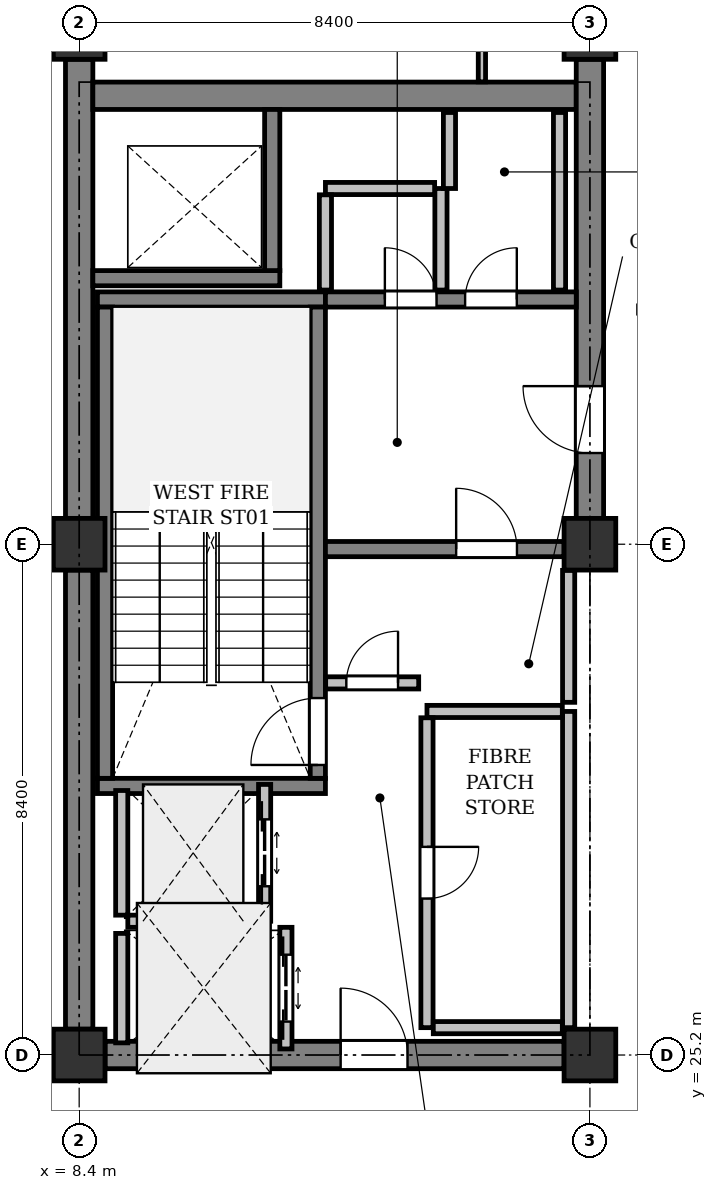
"""IFC4 building model, lengths in metres.
Left out: names, types, materials, properties, quantities, classifications, styles, units other than length and angle.
Written with IfcOpenShell. Run it as: python <this file> out.ifc"""

import sys

from ifc_helpers import new_model, si_unit, direction, frame, frame_2d, origin, origin_2d, place, context, subcontext, project, spatial, rectangle, extrude, element, fill, save


model = new_model("IFC4")
c1 = context("Model", 3, precision=1e-05, world=origin(), true_north=direction((0.0, 1.0)))
c2 = subcontext(c1, "Body", "Model", "MODEL_VIEW")
j1 = project(units=[si_unit("LENGTHUNIT", "METRE"), si_unit("PLANEANGLEUNIT", "RADIAN")], contexts=[c1])
p1 = place(None, origin())
s1 = spatial("IfcSite", under=j1, at=p1, CompositionType="ELEMENT")
p2 = place(p1, origin())
s2 = spatial("IfcBuilding", under=s1, at=p2, CompositionType="ELEMENT")
p3 = place(p2, frame((0.0, 0.0, 302.2)))
s3 = spatial("IfcBuildingStorey", under=s2, at=p3, CompositionType="ELEMENT", Elevation=302.2)
for number, where, z_axis, x_axis in (
    (1, (8.4, 25.2, 0.0), (0.0, 0.0, 1.0), (1.0, 0.0, 0.0)),
    (2, (8.4, 33.6, 0.0), (0.0, 0.0, 1.0), (1.0, 0.0, 0.0)),
    (3, (8.4, 42.0, 0.0), (0.0, 0.0, 1.0), (1.0, 0.0, 0.0)),
    (4, (16.8, 25.2, 0.0), (0.0, 0.0, 1.0), (1.0, 0.0, 0.0)),
    (5, (16.8, 33.6, 0.0), (0.0, 0.0, 1.0), (1.0, 0.0, 0.0)),
    (6, (16.8, 42.0, 0.0), (0.0, 0.0, 1.0), (1.0, 0.0, 0.0)),
):
    element("IfcColumn", number, at=place(p3, frame(where, z_axis=z_axis, x_axis=x_axis)), inside=s3, PredefinedType="COLUMN", context=c2, shape_type="SweptSolid", body=[
        extrude(rectangle(XDim=0.85, YDim=0.85, at=origin_2d()), origin(), (0.0, 0.0, 1.0), 4.0),
    ])
for number, where, z_axis, x_axis in (
    (7, (8.4, 25.625, 0.0), (0.0, 0.0, 1.0), (0.0, 1.0, 0.0)),
    (8, (8.4, 34.025, 0.0), (0.0, 0.0, 1.0), (0.0, 1.0, 0.0)),
):
    element("IfcWall", number, at=place(p3, frame(where, z_axis=z_axis, x_axis=x_axis)), inside=s3, PredefinedType="SHEAR", context=c2, shape_type="SweptSolid", body=[
        extrude(rectangle(XDim=7.55, YDim=0.45, at=frame_2d((3.775, 0.0))), origin(), (0.0, 0.0, 1.0), 3.725),
    ])
p4 = place(p3, frame((8.625, 40.975, 0.0), z_axis=(0.0, 0.0, 1.0), x_axis=(1.0, 0.0, 0.0)))
e9 = element("IfcWall", 9, at=p4, inside=s3, PredefinedType="SHEAR", context=c2, shape_type="SweptSolid", body=[
    extrude(rectangle(XDim=7.95, YDim=0.45, at=frame_2d((3.975, 0.0))), origin(), (0.0, 0.0, 1.0), 3.725),
])
p5 = place(p3, frame((16.8, 34.025, 0.0), z_axis=(0.0, 0.0, 1.0), x_axis=(0.0, 1.0, 0.0)))
e10 = element("IfcWall", 10, at=p5, inside=s3, PredefinedType="SHEAR", context=c2, shape_type="SweptSolid", body=[
    extrude(rectangle(XDim=7.55, YDim=0.45, at=frame_2d((3.775, 0.0))), origin(), (0.0, 0.0, 1.0), 3.725),
])
p6 = place(p5, frame((1.075, 0.0, 0.0)))
e11 = element("IfcOpeningElement", 11, at=p6, cuts=e10, PredefinedType="OPENING", context=c2, shape_type="SweptSolid", body=[
    extrude(rectangle(XDim=1.1, YDim=2.15, at=frame_2d((0.55, 1.075))), frame((0.0, 0.235, 0.0), z_axis=(0.0, -1.0, 0.0), x_axis=(1.0, 0.0, 0.0)), (0.0, 0.0, 1.0), 0.47),
])
p7 = place(p3, frame((8.825, 25.2, 0.0), z_axis=(0.0, 0.0, 1.0), x_axis=(1.0, 0.0, 0.0)))
e12 = element("IfcWall", 12, at=p7, inside=s3, PredefinedType="SHEAR", context=c2, shape_type="SweptSolid", body=[
    extrude(rectangle(XDim=7.55, YDim=0.45, at=frame_2d((3.775, 0.0))), origin(), (0.0, 0.0, 1.0), 3.725),
])
p8 = place(p7, frame((3.875, 0.0, 0.0)))
e13 = element("IfcOpeningElement", 13, at=p8, cuts=e12, PredefinedType="OPENING", context=c2, shape_type="SweptSolid", body=[
    extrude(rectangle(XDim=1.1, YDim=2.15, at=frame_2d((0.55, 1.075))), frame((0.0, 0.235, 0.0), z_axis=(0.0, -1.0, 0.0), x_axis=(1.0, 0.0, 0.0)), (0.0, 0.0, 1.0), 0.47),
])
for number, where, z_axis, x_axis in (
    (14, (12.45, 29.625, 0.0), (0.0, 0.0, 1.0), (-1.0, 0.0, 0.0)),
    (15, (12.45, 37.625, 0.0), (0.0, 0.0, 1.0), (-1.0, 0.0, 0.0)),
):
    element("IfcWall", number, at=place(p3, frame(where, z_axis=z_axis, x_axis=x_axis)), inside=s3, PredefinedType="SHEAR", context=c2, shape_type="SweptSolid", body=[
        extrude(rectangle(XDim=3.75, YDim=0.25, at=frame_2d((1.875, 0.0))), origin(), (0.0, 0.0, 1.0), 3.725),
    ])
p9 = place(p3, frame((12.325, 29.75, 0.0), z_axis=(0.0, 0.0, 1.0), x_axis=(0.0, 1.0, 0.0)))
e16 = element("IfcWall", 16, at=p9, inside=s3, PredefinedType="SHEAR", context=c2, shape_type="SweptSolid", body=[
    extrude(rectangle(XDim=7.75, YDim=0.25, at=frame_2d((3.875, 0.0))), origin(), (0.0, 0.0, 1.0), 3.725),
])
p10 = place(p9, frame((0.22, 0.0, 0.0)))
e17 = element("IfcOpeningElement", 17, at=p10, cuts=e16, PredefinedType="OPENING", context=c2, shape_type="SweptSolid", body=[
    extrude(rectangle(XDim=1.1, YDim=2.15, at=frame_2d((0.55, 1.075))), frame((0.0, 0.135, 0.0), z_axis=(0.0, -1.0, 0.0), x_axis=(1.0, 0.0, 0.0)), (0.0, 0.0, 1.0), 0.27),
])
p11 = place(p3, frame((8.825, 29.75, 0.0), z_axis=(0.0, 0.0, 1.0), x_axis=(0.0, 1.0, 0.0)))
e18 = element("IfcWall", 18, at=p11, inside=s3, PredefinedType="SHEAR", context=c2, shape_type="SweptSolid", body=[
    extrude(rectangle(XDim=7.75, YDim=0.25, at=frame_2d((3.875, 0.0))), origin(), (0.0, 0.0, 1.0), 3.725),
])
p12 = place(p3, frame((8.625, 37.975, 0.0), z_axis=(0.0, 0.0, 1.0), x_axis=(1.0, 0.0, 0.0)))
e19 = element("IfcWall", 19, at=p12, inside=s3, PredefinedType="SHEAR", context=c2, shape_type="SweptSolid", body=[
    extrude(rectangle(XDim=3.075, YDim=0.25, at=frame_2d((1.538, 0.0))), origin(), (0.0, 0.0, 1.0), 3.725),
])
p13 = place(p3, frame((11.575, 38.1, 0.0), z_axis=(0.0, 0.0, 1.0), x_axis=(0.0, 1.0, 0.0)))
e20 = element("IfcWall", 20, at=p13, inside=s3, PredefinedType="SHEAR", context=c2, shape_type="SweptSolid", body=[
    extrude(rectangle(XDim=2.65, YDim=0.25, at=frame_2d((1.325, 0.0))), origin(), (0.0, 0.0, 1.0), 3.725),
])
p14 = place(p3, frame((12.45, 33.52, 0.0), z_axis=(0.0, 0.0, 1.0), x_axis=(1.0, 0.0, 0.0)))
e21 = element("IfcWall", 21, at=p14, inside=s3, PredefinedType="SHEAR", context=c2, shape_type="SweptSolid", body=[
    extrude(rectangle(XDim=3.925, YDim=0.25, at=frame_2d((1.962, 0.0))), origin(), (0.0, 0.0, 1.0), 3.725),
])
p15 = place(p14, frame((2.15, 0.0, 0.0)))
e22 = element("IfcOpeningElement", 22, at=p15, cuts=e21, PredefinedType="OPENING", context=c2, shape_type="SweptSolid", body=[
    extrude(rectangle(XDim=1.0, YDim=2.15, at=frame_2d((0.5, 1.075))), frame((0.0, 0.135, 0.0), z_axis=(0.0, -1.0, 0.0), x_axis=(1.0, 0.0, 0.0)), (0.0, 0.0, 1.0), 0.27),
])
p16 = place(p3, frame((12.45, 37.625, 0.0), z_axis=(0.0, 0.0, 1.0), x_axis=(1.0, 0.0, 0.0)))
e23 = element("IfcWall", 23, at=p16, inside=s3, PredefinedType="SHEAR", context=c2, shape_type="SweptSolid", body=[
    extrude(rectangle(XDim=4.125, YDim=0.25, at=frame_2d((2.062, 0.0))), origin(), (0.0, 0.0, 1.0), 3.725),
])
p17 = place(p16, frame((0.978, 0.0, 0.0)))
e24 = element("IfcOpeningElement", 24, at=p17, cuts=e23, PredefinedType="OPENING", context=c2, shape_type="SweptSolid", body=[
    extrude(rectangle(XDim=0.85, YDim=2.15, at=frame_2d((0.425, 1.075))), frame((0.0, 0.135, 0.0), z_axis=(0.0, -1.0, 0.0), x_axis=(1.0, 0.0, 0.0)), (0.0, 0.0, 1.0), 0.27),
])
p18 = place(p16, frame((2.298, 0.0, 0.0)))
e25 = element("IfcOpeningElement", 25, at=p18, cuts=e23, PredefinedType="OPENING", context=c2, shape_type="SweptSolid", body=[
    extrude(rectangle(XDim=0.85, YDim=2.15, at=frame_2d((0.425, 1.075))), frame((0.0, 0.135, 0.0), z_axis=(0.0, -1.0, 0.0), x_axis=(1.0, 0.0, 0.0)), (0.0, 0.0, 1.0), 0.27),
])
p19 = place(p3, frame((11.45, 27.4, 0.0), z_axis=(0.0, 0.0, 1.0), x_axis=(0.0, 1.0, 0.0)))
e26 = element("IfcWall", 26, at=p19, inside=s3, PredefinedType="PARTITIONING", context=c2, shape_type="SweptSolid", body=[
    extrude(rectangle(XDim=2.25, YDim=0.2, at=frame_2d((1.125, 0.0))), origin(), (0.0, 0.0, 1.0), 3.725),
])
p20 = place(p19, frame((0.575, 0.0, 0.0)))
e27 = element("IfcOpeningElement", 27, at=p20, cuts=e26, PredefinedType="OPENING", context=c2, shape_type="SweptSolid", body=[
    extrude(rectangle(XDim=1.1, YDim=2.2, at=frame_2d((0.55, 1.1))), frame((0.0, 0.11, 0.0), z_axis=(0.0, -1.0, 0.0), x_axis=(1.0, 0.0, 0.0)), (0.0, 0.0, 1.0), 0.22),
])
p21 = place(p3, frame((9.1, 27.5, 0.0), z_axis=(0.0, 0.0, 1.0), x_axis=(0.0, 1.0, 0.0)))
e28 = element("IfcWall", 28, at=p21, inside=s3, PredefinedType="PARTITIONING", context=c2, shape_type="SweptSolid", body=[
    extrude(rectangle(XDim=2.05, YDim=0.2, at=frame_2d((1.025, 0.0))), origin(), (0.0, 0.0, 1.0), 3.725),
])
p22 = place(p3, frame((9.2, 27.4, 0.0), z_axis=(0.0, 0.0, 1.0), x_axis=(1.0, 0.0, 0.0)))
e29 = element("IfcWall", 29, at=p22, inside=s3, PredefinedType="PARTITIONING", context=c2, shape_type="SweptSolid", body=[
    extrude(rectangle(XDim=2.15, YDim=0.2, at=frame_2d((1.075, 0.0))), origin(), (0.0, 0.0, 1.0), 3.725),
])
p23 = place(p3, frame((11.8, 25.3, 0.0), z_axis=(0.0, 0.0, 1.0), x_axis=(0.0, 1.0, 0.0)))
e30 = element("IfcWall", 30, at=p23, inside=s3, PredefinedType="PARTITIONING", context=c2, shape_type="SweptSolid", body=[
    extrude(rectangle(XDim=2.0, YDim=0.2, at=frame_2d((1.0, 0.0))), origin(), (0.0, 0.0, 1.0), 3.725),
])
p24 = place(p23, frame((0.45, 0.0, 0.0)))
e31 = element("IfcOpeningElement", 31, at=p24, cuts=e30, PredefinedType="OPENING", context=c2, shape_type="SweptSolid", body=[
    extrude(rectangle(XDim=1.1, YDim=2.2, at=frame_2d((0.55, 1.1))), frame((0.0, 0.11, 0.0), z_axis=(0.0, -1.0, 0.0), x_axis=(1.0, 0.0, 0.0)), (0.0, 0.0, 1.0), 0.22),
])
p25 = place(p3, frame((9.1, 25.4, 0.0), z_axis=(0.0, 0.0, 1.0), x_axis=(0.0, 1.0, 0.0)))
e32 = element("IfcWall", 32, at=p25, inside=s3, PredefinedType="PARTITIONING", context=c2, shape_type="SweptSolid", body=[
    extrude(rectangle(XDim=1.8, YDim=0.2, at=frame_2d((0.9, 0.0))), origin(), (0.0, 0.0, 1.0), 3.725),
])
p26 = place(p3, frame((16.45, 25.65, 0.0), z_axis=(0.0, 0.0, 1.0), x_axis=(0.0, 1.0, 0.0)))
e33 = element("IfcWall", 33, at=p26, inside=s3, PredefinedType="PARTITIONING", context=c2, shape_type="SweptSolid", body=[
    extrude(rectangle(XDim=5.2, YDim=0.2, at=frame_2d((2.6, 0.0))), origin(), (0.0, 0.0, 1.0), 3.725),
])
p27 = place(p3, frame((16.346, 30.85, 0.0), z_axis=(0.0, 0.0, 1.0), x_axis=(-1.0, 0.0, 0.0)))
e34 = element("IfcWall", 34, at=p27, inside=s3, PredefinedType="PARTITIONING", context=c2, shape_type="SweptSolid", body=[
    extrude(rectangle(XDim=2.226, YDim=0.2, at=frame_2d((1.113, 0.0))), origin(), (0.0, 0.0, 1.0), 3.725),
])
p28 = place(p3, frame((14.12, 30.746, 0.0), z_axis=(0.0, 0.0, 1.0), x_axis=(0.0, -1.0, 0.0)))
e35 = element("IfcWall", 35, at=p28, inside=s3, PredefinedType="PARTITIONING", context=c2, shape_type="SweptSolid", body=[
    extrude(rectangle(XDim=5.096, YDim=0.2, at=frame_2d((2.548, 0.0))), origin(), (0.0, 0.0, 1.0), 3.725),
])
p29 = place(p28, frame((2.123, 0.0, 0.0)))
e36 = element("IfcOpeningElement", 36, at=p29, cuts=e35, PredefinedType="OPENING", context=c2, shape_type="SweptSolid", body=[
    extrude(rectangle(XDim=0.85, YDim=2.15, at=frame_2d((0.425, 1.075))), frame((0.0, 0.11, 0.0), z_axis=(0.0, -1.0, 0.0), x_axis=(1.0, 0.0, 0.0)), (0.0, 0.0, 1.0), 0.22),
])
p30 = place(p3, frame((14.224, 25.65, 0.0), z_axis=(0.0, 0.0, 1.0), x_axis=(1.0, 0.0, 0.0)))
e37 = element("IfcWall", 37, at=p30, inside=s3, PredefinedType="PARTITIONING", context=c2, shape_type="SweptSolid", body=[
    extrude(rectangle(XDim=2.122, YDim=0.2, at=frame_2d((1.061, 0.0))), origin(), (0.0, 0.0, 1.0), 3.725),
])
p31 = place(p3, frame((12.454, 31.32, 0.0), z_axis=(0.0, 0.0, 1.0), x_axis=(0.999999949061, -0.000319182876, 0.0)))
e38 = element("IfcWall", 38, at=p31, inside=s3, PredefinedType="PARTITIONING", context=c2, shape_type="SweptSolid", body=[
    extrude(rectangle(XDim=1.53, YDim=0.2, at=frame_2d((0.765, 0.0))), origin(), (0.0, 0.0, 1.0), 3.725),
])
p32 = place(p31, frame((0.34, 0.0, 0.0)))
e39 = element("IfcOpeningElement", 39, at=p32, cuts=e38, PredefinedType="OPENING", context=c2, shape_type="SweptSolid", body=[
    extrude(rectangle(XDim=0.85, YDim=2.15, at=frame_2d((0.425, 1.075))), frame((0.0, 0.11, 0.0), z_axis=(0.0, -1.0, 0.0), x_axis=(1.0, 0.0, 0.0)), (0.0, 0.0, 1.0), 0.22),
])
p33 = place(p3, frame((16.45, 31.0, 0.0), z_axis=(0.0, 0.0, 1.0), x_axis=(0.0, 1.0, 0.0)))
e40 = element("IfcWall", 40, at=p33, inside=s3, PredefinedType="PARTITIONING", context=c2, shape_type="SweptSolid", body=[
    extrude(rectangle(XDim=2.17, YDim=0.2, at=frame_2d((1.085, 0.0))), origin(), (0.0, 0.0, 1.0), 3.725),
])
p34 = place(p3, frame((14.35, 37.78, 0.0), z_axis=(0.0, 0.0, 1.0), x_axis=(0.0, 1.0, 0.0)))
e41 = element("IfcWall", 41, at=p34, inside=s3, PredefinedType="PARTITIONING", context=c2, shape_type="SweptSolid", body=[
    extrude(rectangle(XDim=1.67, YDim=0.2, at=frame_2d((0.835, 0.0))), origin(), (0.0, 0.0, 1.0), 2.775),
])
p35 = place(p3, frame((14.246, 39.45, 0.0), z_axis=(0.0, 0.0, 1.0), x_axis=(-1.0, 0.0, 0.0)))
e42 = element("IfcWall", 42, at=p35, inside=s3, PredefinedType="PARTITIONING", context=c2, shape_type="SweptSolid", body=[
    extrude(rectangle(XDim=1.796, YDim=0.2, at=frame_2d((0.898, 0.0))), origin(), (0.0, 0.0, 1.0), 2.775),
])
p36 = place(p3, frame((12.45, 39.346, 0.0), z_axis=(0.0, 0.0, 1.0), x_axis=(0.0, -1.0, 0.0)))
e43 = element("IfcWall", 43, at=p36, inside=s3, PredefinedType="PARTITIONING", context=c2, shape_type="SweptSolid", body=[
    extrude(rectangle(XDim=1.566, YDim=0.2, at=frame_2d((0.783, 0.0))), origin(), (0.0, 0.0, 1.0), 2.775),
])
p37 = place(p3, frame((16.3, 37.78, 0.0), z_axis=(0.0, 0.0, 1.0), x_axis=(0.0, 1.0, 0.0)))
e44 = element("IfcWall", 44, at=p37, inside=s3, PredefinedType="PARTITIONING", context=c2, shape_type="SweptSolid", body=[
    extrude(rectangle(XDim=2.92, YDim=0.2, at=frame_2d((1.46, 0.0))), origin(), (0.0, 0.0, 1.0), 2.775),
])
p38 = place(p3, frame((14.49, 40.7, 0.0), z_axis=(0.0, 0.0, 1.0), x_axis=(0.0, -1.0, 0.0)))
e45 = element("IfcWall", 45, at=p38, inside=s3, PredefinedType="PARTITIONING", context=c2, shape_type="SweptSolid", body=[
    extrude(rectangle(XDim=1.25, YDim=0.2, at=frame_2d((0.625, 0.0))), origin(), (0.0, 0.0, 1.0), 2.775),
])
p39 = place(p3, frame((15.023, 41.204, 0.0), z_axis=(0.0, 0.0, 1.0), x_axis=(0.0, 1.0, 0.0)))
e46 = element("IfcWall", 46, at=p39, inside=s3, PredefinedType="PARTITIONING", context=c2, shape_type="SweptSolid", body=[
    extrude(rectangle(XDim=0.627, YDim=0.12, at=frame_2d((0.313, 0.0))), origin(), (0.0, 0.0, 1.0), 3.725),
])
p40 = place(p6, origin())
e47 = element("IfcDoor", 47, at=p40, inside=s3, OperationType="SINGLE_SWING_RIGHT", PredefinedType="DOOR", context=c2, shape_type="SweptSolid", body=[
    extrude(rectangle(XDim=1.1, YDim=2.15, at=frame_2d((0.55, 1.075))), frame((0.0, 0.025, 0.0), z_axis=(0.0, -1.0, 0.0), x_axis=(1.0, 0.0, 0.0)), (0.0, 0.0, 1.0), 0.05),
])
fill(e11, e47)
p41 = place(p8, origin())
e48 = element("IfcDoor", 48, at=p41, inside=s3, OperationType="SINGLE_SWING_LEFT", PredefinedType="DOOR", context=c2, shape_type="SweptSolid", body=[
    extrude(rectangle(XDim=1.1, YDim=2.15, at=frame_2d((0.55, 1.075))), frame((0.0, 0.025, 0.0), z_axis=(0.0, -1.0, 0.0), x_axis=(1.0, 0.0, 0.0)), (0.0, 0.0, 1.0), 0.05),
])
fill(e13, e48)
p42 = place(p10, origin())
e49 = element("IfcDoor", 49, at=p42, inside=s3, OperationType="SINGLE_SWING_LEFT", PredefinedType="DOOR", context=c2, shape_type="SweptSolid", body=[
    extrude(rectangle(XDim=1.1, YDim=2.15, at=frame_2d((0.55, 1.075))), frame((0.0, 0.025, 0.0), z_axis=(0.0, -1.0, 0.0), x_axis=(1.0, 0.0, 0.0)), (0.0, 0.0, 1.0), 0.05),
])
fill(e17, e49)
p43 = place(p15, origin())
e50 = element("IfcDoor", 50, at=p43, inside=s3, OperationType="SINGLE_SWING_LEFT", PredefinedType="DOOR", context=c2, shape_type="SweptSolid", body=[
    extrude(rectangle(XDim=1.0, YDim=2.15, at=frame_2d((0.5, 1.075))), frame((0.0, 0.025, 0.0), z_axis=(0.0, -1.0, 0.0), x_axis=(1.0, 0.0, 0.0)), (0.0, 0.0, 1.0), 0.05),
])
fill(e22, e50)
p44 = place(p20, origin())
e51 = element("IfcDoor", 51, at=p44, inside=s3, OperationType="DOUBLE_DOOR_SLIDING", PredefinedType="DOOR", context=c2, shape_type="SweptSolid", body=[
    extrude(rectangle(XDim=1.1, YDim=2.2, at=frame_2d((0.55, 1.1))), frame((0.0, 0.025, 0.0), z_axis=(0.0, -1.0, 0.0), x_axis=(1.0, 0.0, 0.0)), (0.0, 0.0, 1.0), 0.05),
])
fill(e27, e51)
p45 = place(p24, origin())
e52 = element("IfcDoor", 52, at=p45, inside=s3, OperationType="DOUBLE_DOOR_SLIDING", PredefinedType="DOOR", context=c2, shape_type="SweptSolid", body=[
    extrude(rectangle(XDim=1.1, YDim=2.2, at=frame_2d((0.55, 1.1))), frame((0.0, 0.025, 0.0), z_axis=(0.0, -1.0, 0.0), x_axis=(1.0, 0.0, 0.0)), (0.0, 0.0, 1.0), 0.05),
])
fill(e31, e52)
p46 = place(p29, origin())
e53 = element("IfcDoor", 53, at=p46, inside=s3, OperationType="SINGLE_SWING_LEFT", PredefinedType="DOOR", context=c2, shape_type="SweptSolid", body=[
    extrude(rectangle(XDim=0.85, YDim=2.15, at=frame_2d((0.425, 1.075))), frame((0.0, 0.025, 0.0), z_axis=(0.0, -1.0, 0.0), x_axis=(1.0, 0.0, 0.0)), (0.0, 0.0, 1.0), 0.05),
])
fill(e36, e53)
p47 = place(p32, origin())
e54 = element("IfcDoor", 54, at=p47, inside=s3, OperationType="SINGLE_SWING_RIGHT", PredefinedType="DOOR", context=c2, shape_type="SweptSolid", body=[
    extrude(rectangle(XDim=0.85, YDim=2.15, at=frame_2d((0.425, 1.075))), frame((0.0, 0.025, 0.0), z_axis=(0.0, -1.0, 0.0), x_axis=(1.0, 0.0, 0.0)), (0.0, 0.0, 1.0), 0.05),
])
fill(e39, e54)
p48 = place(p17, origin())
e55 = element("IfcDoor", 55, at=p48, inside=s3, OperationType="SINGLE_SWING_LEFT", PredefinedType="DOOR", context=c2, shape_type="SweptSolid", body=[
    extrude(rectangle(XDim=0.85, YDim=2.15, at=frame_2d((0.425, 1.075))), frame((0.0, 0.025, 0.0), z_axis=(0.0, -1.0, 0.0), x_axis=(1.0, 0.0, 0.0)), (0.0, 0.0, 1.0), 0.05),
])
fill(e24, e55)
p49 = place(p18, origin())
e56 = element("IfcDoor", 56, at=p49, inside=s3, OperationType="SINGLE_SWING_RIGHT", PredefinedType="DOOR", context=c2, shape_type="SweptSolid", body=[
    extrude(rectangle(XDim=0.85, YDim=2.15, at=frame_2d((0.425, 1.075))), frame((0.0, 0.025, 0.0), z_axis=(0.0, -1.0, 0.0), x_axis=(1.0, 0.0, 0.0)), (0.0, 0.0, 1.0), 0.05),
])
fill(e25, e56)
save(model, sys.argv[1])
